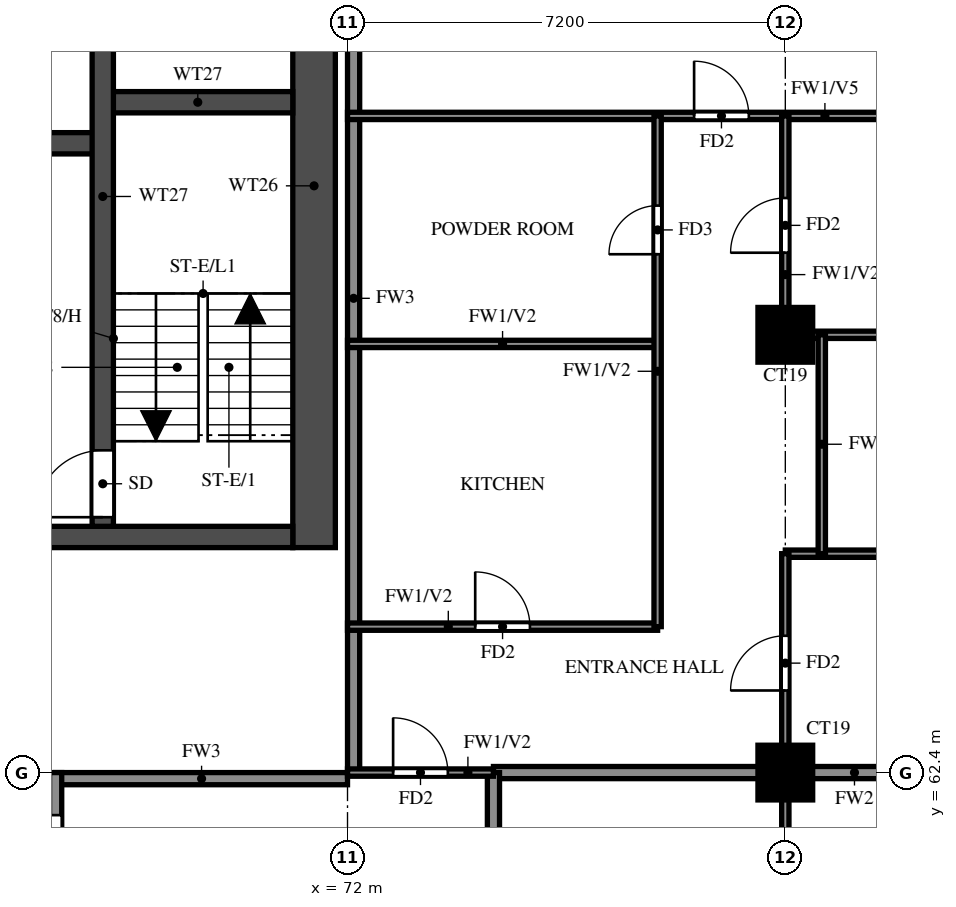
"""IFC4 building model, lengths in metres.
Left out: names, types, materials, properties, quantities, classifications, styles, units other than length and angle.
Written with IfcOpenShell. Run it as: python <this file> out.ifc"""

import sys

from ifc_helpers import new_model, si_unit, direction, frame, frame_2d, origin, origin_2d, place, context, subcontext, project, spatial, rectangle, extrude, source, transform, mapped, element, fill, save


model = new_model("IFC4")
c1 = context("Model", 3, precision=1e-05, world=origin(), true_north=direction((0.0, 1.0)))
c2 = subcontext(c1, "Body", "Model", "MODEL_VIEW")
j1 = project(units=[si_unit("LENGTHUNIT", "METRE"), si_unit("PLANEANGLEUNIT", "RADIAN")], contexts=[c1])
p1 = place(None, origin())
s1 = spatial("IfcSite", under=j1, at=p1, CompositionType="ELEMENT")
p2 = place(p1, origin())
s2 = spatial("IfcBuilding", under=s1, at=p2, CompositionType="ELEMENT")
p3 = place(p2, frame((0.0, 0.0, 195.5)))
s3 = spatial("IfcBuildingStorey", under=s2, at=p3, CompositionType="ELEMENT", Elevation=195.5)
m1 = source(origin(), c2, "Body", "SweptSolid", [
    extrude(rectangle(XDim=0.9, YDim=0.9, at=origin_2d()), origin(), (0.0, 0.0, 1.0), 3.2),
])
for number, where, z_axis, x_axis in (
    (1, (79.2, 62.4, 0.0), (0.0, 0.0, 1.0), (1.0, 0.0, 0.0)),
    (2, (79.2, 69.6, 0.0), (0.0, 0.0, 1.0), (1.0, 0.0, 0.0)),
):
    element("IfcColumn", number, at=place(p3, frame(where, z_axis=z_axis, x_axis=x_axis)), inside=s3, PredefinedType="COLUMN", context=c2, shape_type="MappedRepresentation", body=[
        mapped(m1, transform((0.0, 0.0, 0.0))),
    ])
p4 = place(p3, frame((71.45, 66.1, 0.0), z_axis=(0.0, 0.0, 1.0), x_axis=(0.0, 1.0, 0.0)))
e3 = element("IfcWall", 3, at=p4, inside=s3, PredefinedType="SHEAR", context=c2, shape_type="SweptSolid", body=[
    extrude(rectangle(XDim=11.9, YDim=0.7, at=frame_2d((5.95, 0.0))), origin(), (0.0, 0.0, 1.0), 3.2),
])
p5 = place(p3, frame((29.7, 66.275, 0.0), z_axis=(0.0, 0.0, 1.0), x_axis=(1.0, 0.0, 0.0)))
e4 = element("IfcWall", 4, at=p5, inside=s3, PredefinedType="SHEAR", context=c2, shape_type="SweptSolid", body=[
    extrude(rectangle(XDim=41.4, YDim=0.35, at=frame_2d((20.7, 0.0))), origin(), (0.0, 0.0, 1.0), 3.2),
])
p6 = place(p5, frame((0.925, 0.0, 0.0)))
e5 = element("IfcOpeningElement", 5, at=p6, cuts=e4, PredefinedType="OPENING", context=c2, shape_type="SweptSolid", body=[
    extrude(rectangle(XDim=1.1, YDim=2.1, at=frame_2d((0.55, 1.05))), frame((0.0, 0.185, 0.0), z_axis=(0.0, -1.0, 0.0), x_axis=(1.0, 0.0, 0.0)), (0.0, 0.0, 1.0), 0.37),
])
p7 = place(p5, frame((3.712, 0.0, 0.0)))
e6 = element("IfcOpeningElement", 6, at=p7, cuts=e4, PredefinedType="OPENING", context=c2, shape_type="SweptSolid", body=[
    extrude(rectangle(XDim=1.8, YDim=2.1, at=frame_2d((0.9, 1.05))), frame((0.0, 0.185, 0.0), z_axis=(0.0, -1.0, 0.0), x_axis=(1.0, 0.0, 0.0)), (0.0, 0.0, 1.0), 0.37),
])
p8 = place(p3, frame((32.825, 72.75, 0.0), z_axis=(0.0, 0.0, 1.0), x_axis=(1.0, 0.0, 0.0)))
e7 = element("IfcWall", 7, at=p8, inside=s3, PredefinedType="SHEAR", context=c2, shape_type="SweptSolid", body=[
    extrude(rectangle(XDim=35.15, YDim=0.35, at=frame_2d((17.575, 0.0))), origin(), (0.0, 0.0, 1.0), 3.2),
])
p9 = place(p8, frame((19.8, 0.0, 0.0)))
e8 = element("IfcOpeningElement", 8, at=p9, cuts=e7, PredefinedType="OPENING", context=c2, shape_type="SweptSolid", body=[
    extrude(rectangle(XDim=1.1, YDim=2.1, at=frame_2d((0.55, 1.05))), frame((0.0, 0.185, 0.0), z_axis=(0.0, -1.0, 0.0), x_axis=(1.0, 0.0, 0.0)), (0.0, 0.0, 1.0), 0.37),
])
p10 = place(p8, frame((27.7, 0.0, 0.0)))
e9 = element("IfcOpeningElement", 9, at=p10, cuts=e7, PredefinedType="OPENING", context=c2, shape_type="SweptSolid", body=[
    extrude(rectangle(XDim=1.1, YDim=2.1, at=frame_2d((0.55, 1.05))), frame((0.0, 0.185, 0.0), z_axis=(0.0, -1.0, 0.0), x_axis=(1.0, 0.0, 0.0)), (0.0, 0.0, 1.0), 0.37),
])
p11 = place(p8, frame((30.3, 0.0, 0.0)))
e10 = element("IfcOpeningElement", 10, at=p11, cuts=e7, PredefinedType="OPENING", context=c2, shape_type="SweptSolid", body=[
    extrude(rectangle(XDim=1.1, YDim=2.1, at=frame_2d((0.55, 1.05))), frame((0.0, 0.185, 0.0), z_axis=(0.0, -1.0, 0.0), x_axis=(1.0, 0.0, 0.0)), (0.0, 0.0, 1.0), 0.37),
])
p12 = place(p8, frame((3.8, 0.0, 0.0)))
e11 = element("IfcOpeningElement", 11, at=p12, cuts=e7, PredefinedType="OPENING", context=c2, shape_type="SweptSolid", body=[
    extrude(rectangle(XDim=1.1, YDim=2.1, at=frame_2d((0.55, 1.05))), frame((0.0, 0.185, 0.0), z_axis=(0.0, -1.0, 0.0), x_axis=(1.0, 0.0, 0.0)), (0.0, 0.0, 1.0), 0.37),
])
p13 = place(p8, frame((6.55, 0.0, 0.0)))
e12 = element("IfcOpeningElement", 12, at=p13, cuts=e7, PredefinedType="OPENING", context=c2, shape_type="SweptSolid", body=[
    extrude(rectangle(XDim=1.1, YDim=2.1, at=frame_2d((0.55, 1.05))), frame((0.0, 0.185, 0.0), z_axis=(0.0, -1.0, 0.0), x_axis=(1.0, 0.0, 0.0)), (0.0, 0.0, 1.0), 0.37),
])
p14 = place(p8, frame((9.3, 0.0, 0.0)))
e13 = element("IfcOpeningElement", 13, at=p14, cuts=e7, PredefinedType="OPENING", context=c2, shape_type="SweptSolid", body=[
    extrude(rectangle(XDim=1.1, YDim=2.1, at=frame_2d((0.55, 1.05))), frame((0.0, 0.185, 0.0), z_axis=(0.0, -1.0, 0.0), x_axis=(1.0, 0.0, 0.0)), (0.0, 0.0, 1.0), 0.37),
])
p15 = place(p8, frame((12.05, 0.0, 0.0)))
e14 = element("IfcOpeningElement", 14, at=p15, cuts=e7, PredefinedType="OPENING", context=c2, shape_type="SweptSolid", body=[
    extrude(rectangle(XDim=1.1, YDim=2.1, at=frame_2d((0.55, 1.05))), frame((0.0, 0.185, 0.0), z_axis=(0.0, -1.0, 0.0), x_axis=(1.0, 0.0, 0.0)), (0.0, 0.0, 1.0), 0.37),
])
p16 = place(p8, frame((14.8, 0.0, 0.0)))
e15 = element("IfcOpeningElement", 15, at=p16, cuts=e7, PredefinedType="OPENING", context=c2, shape_type="SweptSolid", body=[
    extrude(rectangle(XDim=1.1, YDim=2.1, at=frame_2d((0.55, 1.05))), frame((0.0, 0.185, 0.0), z_axis=(0.0, -1.0, 0.0), x_axis=(1.0, 0.0, 0.0)), (0.0, 0.0, 1.0), 0.37),
])
p17 = place(p8, frame((17.55, 0.0, 0.0)))
e16 = element("IfcOpeningElement", 16, at=p17, cuts=e7, PredefinedType="OPENING", context=c2, shape_type="SweptSolid", body=[
    extrude(rectangle(XDim=1.1, YDim=2.1, at=frame_2d((0.55, 1.05))), frame((0.0, 0.185, 0.0), z_axis=(0.0, -1.0, 0.0), x_axis=(1.0, 0.0, 0.0)), (0.0, 0.0, 1.0), 0.37),
])
p18 = place(p8, frame((0.938, 0.0, 0.0)))
e17 = element("IfcOpeningElement", 17, at=p18, cuts=e7, PredefinedType="OPENING", context=c2, shape_type="SweptSolid", body=[
    extrude(rectangle(XDim=1.1, YDim=2.1, at=frame_2d((0.55, 1.05))), frame((0.0, 0.185, 0.0), z_axis=(0.0, -1.0, 0.0), x_axis=(1.0, 0.0, 0.0)), (0.0, 0.0, 1.0), 0.37),
])
p19 = place(p3, frame((67.975, 73.425, 0.0), z_axis=(0.0, 0.0, 1.0), x_axis=(1.0, 0.0, 0.0)))
e18 = element("IfcWall", 18, at=p19, inside=s3, PredefinedType="SHEAR", context=c2, shape_type="SweptSolid", body=[
    extrude(rectangle(XDim=3.125, YDim=0.35, at=frame_2d((1.562, 0.0))), origin(), (0.0, 0.0, 1.0), 3.2),
])
p20 = place(p3, frame((67.975, 66.45, 0.0), z_axis=(0.0, 0.0, 1.0), x_axis=(0.0, 1.0, 0.0)))
e19 = element("IfcWall", 19, at=p20, inside=s3, PredefinedType="SHEAR", context=c2, shape_type="SweptSolid", body=[
    extrude(rectangle(XDim=10.85, YDim=0.35, at=frame_2d((5.425, 0.0))), origin(), (0.0, 0.0, 1.0), 3.2),
])
p21 = place(p20, frame((0.15, 0.0, 0.0)))
e20 = element("IfcOpeningElement", 20, at=p21, cuts=e19, PredefinedType="OPENING", context=c2, shape_type="SweptSolid", body=[
    extrude(rectangle(XDim=1.1, YDim=2.1, at=frame_2d((0.55, 1.05))), frame((0.0, 0.185, 0.0), z_axis=(0.0, -1.0, 0.0), x_axis=(1.0, 0.0, 0.0)), (0.0, 0.0, 1.0), 0.37),
])
p22 = place(p3, frame((67.2, 62.3, 0.0), z_axis=(0.0, 0.0, 1.0), x_axis=(1.0, 0.0, 0.0)))
e21 = element("IfcWall", 21, at=p22, inside=s3, PredefinedType="SOLIDWALL", context=c2, shape_type="SweptSolid", body=[
    extrude(rectangle(XDim=4.8, YDim=0.2, at=frame_2d((2.4, 0.0))), origin(), (0.0, 0.0, 1.0), 3.2),
])
p23 = place(p3, frame((67.2, 60.0, 0.0), z_axis=(0.0, 0.0, 1.0), x_axis=(0.0, 1.0, 0.0)))
e22 = element("IfcWall", 22, at=p23, inside=s3, PredefinedType="SOLIDWALL", context=c2, shape_type="SweptSolid", body=[
    extrude(rectangle(XDim=2.4, YDim=0.2, at=frame_2d((1.2, 0.0))), origin(), (0.0, 0.0, 1.0), 3.2),
])
p24 = place(p23, frame((0.7, 0.0, 0.0)))
e23 = element("IfcOpeningElement", 23, at=p24, cuts=e22, PredefinedType="OPENING", context=c2, shape_type="SweptSolid", body=[
    extrude(rectangle(XDim=1.0, YDim=2.1, at=frame_2d((0.5, 1.05))), frame((0.0, 0.11, 0.0), z_axis=(0.0, -1.0, 0.0), x_axis=(1.0, 0.0, 0.0)), (0.0, 0.0, 1.0), 0.22),
])
p25 = place(p3, frame((72.1, 62.4, 0.0), z_axis=(0.0, 0.0, 1.0), x_axis=(0.0, 1.0, 0.0)))
e24 = element("IfcWall", 24, at=p25, inside=s3, PredefinedType="SOLIDWALL", context=c2, shape_type="SweptSolid", body=[
    extrude(rectangle(XDim=15.6, YDim=0.2, at=frame_2d((7.8, 0.0))), origin(), (0.0, 0.0, 1.0), 3.2),
])
p26 = place(p3, frame((74.4, 62.4, 0.0), z_axis=(0.0, 0.0, 1.0), x_axis=(1.0, 0.0, 0.0)))
e25 = element("IfcWall", 25, at=p26, inside=s3, PredefinedType="SOLIDWALL", context=c2, shape_type="SweptSolid", body=[
    extrude(rectangle(XDim=11.875, YDim=0.2, at=frame_2d((5.938, 0.0))), origin(), (0.0, 0.0, 1.0), 3.2),
])
p27 = place(p3, frame((74.4, 60.0, 0.0), z_axis=(0.0, 0.0, 1.0), x_axis=(0.0, 1.0, 0.0)))
e26 = element("IfcWall", 26, at=p27, inside=s3, PredefinedType="SOLIDWALL", context=c2, shape_type="SweptSolid", body=[
    extrude(rectangle(XDim=2.4, YDim=0.2, at=frame_2d((1.2, 0.0))), origin(), (0.0, 0.0, 1.0), 3.2),
])
p28 = place(p3, frame((72.0, 62.4, 0.0), z_axis=(0.0, 0.0, 1.0), x_axis=(1.0, 0.0, 0.0)))
e27 = element("IfcWall", 27, at=p28, inside=s3, PredefinedType="PARTITIONING", context=c2, shape_type="SweptSolid", body=[
    extrude(rectangle(XDim=2.4, YDim=0.12, at=frame_2d((1.2, 0.0))), origin(), (0.0, 0.0, 1.0), 3.2),
])
p29 = place(p28, frame((0.75, 0.0, 0.0)))
e28 = element("IfcOpeningElement", 28, at=p29, cuts=e27, PredefinedType="OPENING", context=c2, shape_type="SweptSolid", body=[
    extrude(rectangle(XDim=0.9, YDim=2.1, at=frame_2d((0.45, 1.05))), frame((0.0, 0.07, 0.0), z_axis=(0.0, -1.0, 0.0), x_axis=(1.0, 0.0, 0.0)), (0.0, 0.0, 1.0), 0.14),
])
p30 = place(p3, frame((72.0, 64.8, 0.0), z_axis=(0.0, 0.0, 1.0), x_axis=(1.0, 0.0, 0.0)))
e29 = element("IfcWall", 29, at=p30, inside=s3, PredefinedType="PARTITIONING", context=c2, shape_type="SweptSolid", body=[
    extrude(rectangle(XDim=5.1, YDim=0.12, at=frame_2d((2.55, 0.0))), origin(), (0.0, 0.0, 1.0), 3.2),
])
p31 = place(p30, frame((2.1, 0.0, 0.0)))
e30 = element("IfcOpeningElement", 30, at=p31, cuts=e29, PredefinedType="OPENING", context=c2, shape_type="SweptSolid", body=[
    extrude(rectangle(XDim=0.9, YDim=2.1, at=frame_2d((0.45, 1.05))), frame((0.0, 0.07, 0.0), z_axis=(0.0, -1.0, 0.0), x_axis=(1.0, 0.0, 0.0)), (0.0, 0.0, 1.0), 0.14),
])
p32 = place(p3, frame((79.2, 66.0, 0.0), z_axis=(0.0, 0.0, 1.0), x_axis=(1.0, 0.0, 0.0)))
e31 = element("IfcWall", 31, at=p32, inside=s3, PredefinedType="PARTITIONING", context=c2, shape_type="SweptSolid", body=[
    extrude(rectangle(XDim=7.075, YDim=0.12, at=frame_2d((3.538, 0.0))), origin(), (0.0, 0.0, 1.0), 2.3),
])
p33 = place(p32, frame((3.438, 0.0, 0.0)))
e32 = element("IfcOpeningElement", 32, at=p33, cuts=e31, PredefinedType="OPENING", context=c2, shape_type="SweptSolid", body=[
    extrude(rectangle(XDim=0.8, YDim=2.1, at=frame_2d((0.4, 1.05))), frame((0.0, 0.07, 0.0), z_axis=(0.0, -1.0, 0.0), x_axis=(1.0, 0.0, 0.0)), (0.0, 0.0, 1.0), 0.14),
])
p34 = place(p3, frame((72.0, 69.45, 0.0), z_axis=(0.0, 0.0, 1.0), x_axis=(1.0, 0.0, 0.0)))
e33 = element("IfcWall", 33, at=p34, inside=s3, PredefinedType="PARTITIONING", context=c2, shape_type="SweptSolid", body=[
    extrude(rectangle(XDim=5.1, YDim=0.12, at=frame_2d((2.55, 0.0))), origin(), (0.0, 0.0, 1.0), 3.2),
])
p35 = place(p3, frame((79.2, 69.6, 0.0), z_axis=(0.0, 0.0, 1.0), x_axis=(1.0, 0.0, 0.0)))
e34 = element("IfcWall", 34, at=p35, inside=s3, PredefinedType="PARTITIONING", context=c2, shape_type="SweptSolid", body=[
    extrude(rectangle(XDim=7.075, YDim=0.12, at=frame_2d((3.538, 0.0))), origin(), (0.0, 0.0, 1.0), 3.2),
])
p36 = place(p3, frame((72.0, 73.2, 0.0), z_axis=(0.0, 0.0, 1.0), x_axis=(1.0, 0.0, 0.0)))
e35 = element("IfcWall", 35, at=p36, inside=s3, PredefinedType="PARTITIONING", context=c2, shape_type="SweptSolid", body=[
    extrude(rectangle(XDim=14.275, YDim=0.12, at=frame_2d((7.137, 0.0))), origin(), (0.0, 0.0, 1.0), 2.3),
])
p37 = place(p36, frame((5.7, 0.0, 0.0)))
e36 = element("IfcOpeningElement", 36, at=p37, cuts=e35, PredefinedType="OPENING", context=c2, shape_type="SweptSolid", body=[
    extrude(rectangle(XDim=0.9, YDim=2.1, at=frame_2d((0.45, 1.05))), frame((0.0, 0.07, 0.0), z_axis=(0.0, -1.0, 0.0), x_axis=(1.0, 0.0, 0.0)), (0.0, 0.0, 1.0), 0.14),
])
p38 = place(p3, frame((77.1, 64.8, 0.0), z_axis=(0.0, 0.0, 1.0), x_axis=(0.0, 1.0, 0.0)))
e37 = element("IfcWall", 37, at=p38, inside=s3, PredefinedType="PARTITIONING", context=c2, shape_type="SweptSolid", body=[
    extrude(rectangle(XDim=8.4, YDim=0.12, at=frame_2d((4.2, 0.0))), origin(), (0.0, 0.0, 1.0), 3.2),
])
p39 = place(p38, frame((6.125, 0.0, 0.0)))
e38 = element("IfcOpeningElement", 38, at=p39, cuts=e37, PredefinedType="OPENING", context=c2, shape_type="SweptSolid", body=[
    extrude(rectangle(XDim=0.8, YDim=2.1, at=frame_2d((0.4, 1.05))), frame((0.0, 0.07, 0.0), z_axis=(0.0, -1.0, 0.0), x_axis=(1.0, 0.0, 0.0)), (0.0, 0.0, 1.0), 0.14),
])
p40 = place(p3, frame((79.2, 55.2, 0.0), z_axis=(0.0, 0.0, 1.0), x_axis=(0.0, 1.0, 0.0)))
e39 = element("IfcWall", 39, at=p40, inside=s3, PredefinedType="PARTITIONING", context=c2, shape_type="SweptSolid", body=[
    extrude(rectangle(XDim=10.8, YDim=0.12, at=frame_2d((5.4, 0.0))), origin(), (0.0, 0.0, 1.0), 3.2),
])
p41 = place(p40, frame((2.85, 0.0, 0.0)))
e40 = element("IfcOpeningElement", 40, at=p41, cuts=e39, PredefinedType="OPENING", context=c2, shape_type="SweptSolid", body=[
    extrude(rectangle(XDim=1.5, YDim=2.1, at=frame_2d((0.75, 1.05))), frame((0.0, 0.07, 0.0), z_axis=(0.0, -1.0, 0.0), x_axis=(1.0, 0.0, 0.0)), (0.0, 0.0, 1.0), 0.14),
])
p42 = place(p40, frame((8.55, 0.0, 0.0)))
e41 = element("IfcOpeningElement", 41, at=p42, cuts=e39, PredefinedType="OPENING", context=c2, shape_type="SweptSolid", body=[
    extrude(rectangle(XDim=0.9, YDim=2.1, at=frame_2d((0.45, 1.05))), frame((0.0, 0.07, 0.0), z_axis=(0.0, -1.0, 0.0), x_axis=(1.0, 0.0, 0.0)), (0.0, 0.0, 1.0), 0.14),
])
p43 = place(p3, frame((79.2, 69.6, 0.0), z_axis=(0.0, 0.0, 1.0), x_axis=(0.0, 1.0, 0.0)))
e42 = element("IfcWall", 42, at=p43, inside=s3, PredefinedType="PARTITIONING", context=c2, shape_type="SweptSolid", body=[
    extrude(rectangle(XDim=3.6, YDim=0.12, at=frame_2d((1.8, 0.0))), origin(), (0.0, 0.0, 1.0), 3.2),
])
p44 = place(p43, frame((1.35, 0.0, 0.0)))
e43 = element("IfcOpeningElement", 43, at=p44, cuts=e42, PredefinedType="OPENING", context=c2, shape_type="SweptSolid", body=[
    extrude(rectangle(XDim=0.9, YDim=2.1, at=frame_2d((0.45, 1.05))), frame((0.0, 0.07, 0.0), z_axis=(0.0, -1.0, 0.0), x_axis=(1.0, 0.0, 0.0)), (0.0, 0.0, 1.0), 0.14),
])
p45 = place(p3, frame((79.8, 66.0, 0.0), z_axis=(0.0, 0.0, 1.0), x_axis=(0.0, 1.0, 0.0)))
e44 = element("IfcWall", 44, at=p45, inside=s3, PredefinedType="PARTITIONING", context=c2, shape_type="SweptSolid", body=[
    extrude(rectangle(XDim=3.6, YDim=0.12, at=frame_2d((1.8, 0.0))), origin(), (0.0, 0.0, 1.0), 3.2),
])
p46 = place(p21, origin())
e45 = element("IfcDoor", 45, at=p46, inside=s3, OperationType="SINGLE_SWING_LEFT", PredefinedType="DOOR", context=c2, shape_type="SweptSolid", body=[
    extrude(rectangle(XDim=1.1, YDim=2.1, at=frame_2d((0.55, 1.05))), frame((0.0, 0.025, 0.0), z_axis=(0.0, -1.0, 0.0), x_axis=(1.0, 0.0, 0.0)), (0.0, 0.0, 1.0), 0.05),
])
fill(e20, e45)
p47 = place(p29, origin())
e46 = element("IfcDoor", 46, at=p47, inside=s3, OperationType="SINGLE_SWING_LEFT", PredefinedType="DOOR", context=c2, shape_type="SweptSolid", body=[
    extrude(rectangle(XDim=0.9, YDim=2.1, at=frame_2d((0.45, 1.05))), frame((0.0, 0.025, 0.0), z_axis=(0.0, -1.0, 0.0), x_axis=(1.0, 0.0, 0.0)), (0.0, 0.0, 1.0), 0.05),
])
fill(e28, e46)
p48 = place(p24, origin())
e47 = element("IfcDoor", 47, at=p48, inside=s3, OperationType="SINGLE_SWING_RIGHT", PredefinedType="DOOR", context=c2, shape_type="SweptSolid", body=[
    extrude(rectangle(XDim=1.0, YDim=2.1, at=frame_2d((0.5, 1.05))), frame((0.0, 0.025, 0.0), z_axis=(0.0, -1.0, 0.0), x_axis=(1.0, 0.0, 0.0)), (0.0, 0.0, 1.0), 0.05),
])
fill(e23, e47)
p49 = place(p42, origin())
e48 = element("IfcDoor", 48, at=p49, inside=s3, OperationType="SINGLE_SWING_LEFT", PredefinedType="DOOR", context=c2, shape_type="SweptSolid", body=[
    extrude(rectangle(XDim=0.9, YDim=2.1, at=frame_2d((0.45, 1.05))), frame((0.0, 0.025, 0.0), z_axis=(0.0, -1.0, 0.0), x_axis=(1.0, 0.0, 0.0)), (0.0, 0.0, 1.0), 0.05),
])
fill(e41, e48)
p50 = place(p44, origin())
e49 = element("IfcDoor", 49, at=p50, inside=s3, OperationType="SINGLE_SWING_RIGHT", PredefinedType="DOOR", context=c2, shape_type="SweptSolid", body=[
    extrude(rectangle(XDim=0.9, YDim=2.1, at=frame_2d((0.45, 1.05))), frame((0.0, 0.025, 0.0), z_axis=(0.0, -1.0, 0.0), x_axis=(1.0, 0.0, 0.0)), (0.0, 0.0, 1.0), 0.05),
])
fill(e43, e49)
p51 = place(p37, origin())
e50 = element("IfcDoor", 50, at=p51, inside=s3, OperationType="SINGLE_SWING_LEFT", PredefinedType="DOOR", context=c2, shape_type="SweptSolid", body=[
    extrude(rectangle(XDim=0.9, YDim=2.1, at=frame_2d((0.45, 1.05))), frame((0.0, 0.025, 0.0), z_axis=(0.0, -1.0, 0.0), x_axis=(1.0, 0.0, 0.0)), (0.0, 0.0, 1.0), 0.05),
])
fill(e36, e50)
p52 = place(p31, origin())
e51 = element("IfcDoor", 51, at=p52, inside=s3, OperationType="SINGLE_SWING_LEFT", PredefinedType="DOOR", context=c2, shape_type="SweptSolid", body=[
    extrude(rectangle(XDim=0.9, YDim=2.1, at=frame_2d((0.45, 1.05))), frame((0.0, 0.025, 0.0), z_axis=(0.0, -1.0, 0.0), x_axis=(1.0, 0.0, 0.0)), (0.0, 0.0, 1.0), 0.05),
])
fill(e30, e51)
p53 = place(p39, origin())
e52 = element("IfcDoor", 52, at=p53, inside=s3, OperationType="SINGLE_SWING_RIGHT", PredefinedType="DOOR", context=c2, shape_type="SweptSolid", body=[
    extrude(rectangle(XDim=0.8, YDim=2.1, at=frame_2d((0.4, 1.05))), frame((0.0, 0.025, 0.0), z_axis=(0.0, -1.0, 0.0), x_axis=(1.0, 0.0, 0.0)), (0.0, 0.0, 1.0), 0.05),
])
fill(e38, e52)
save(model, sys.argv[1])
